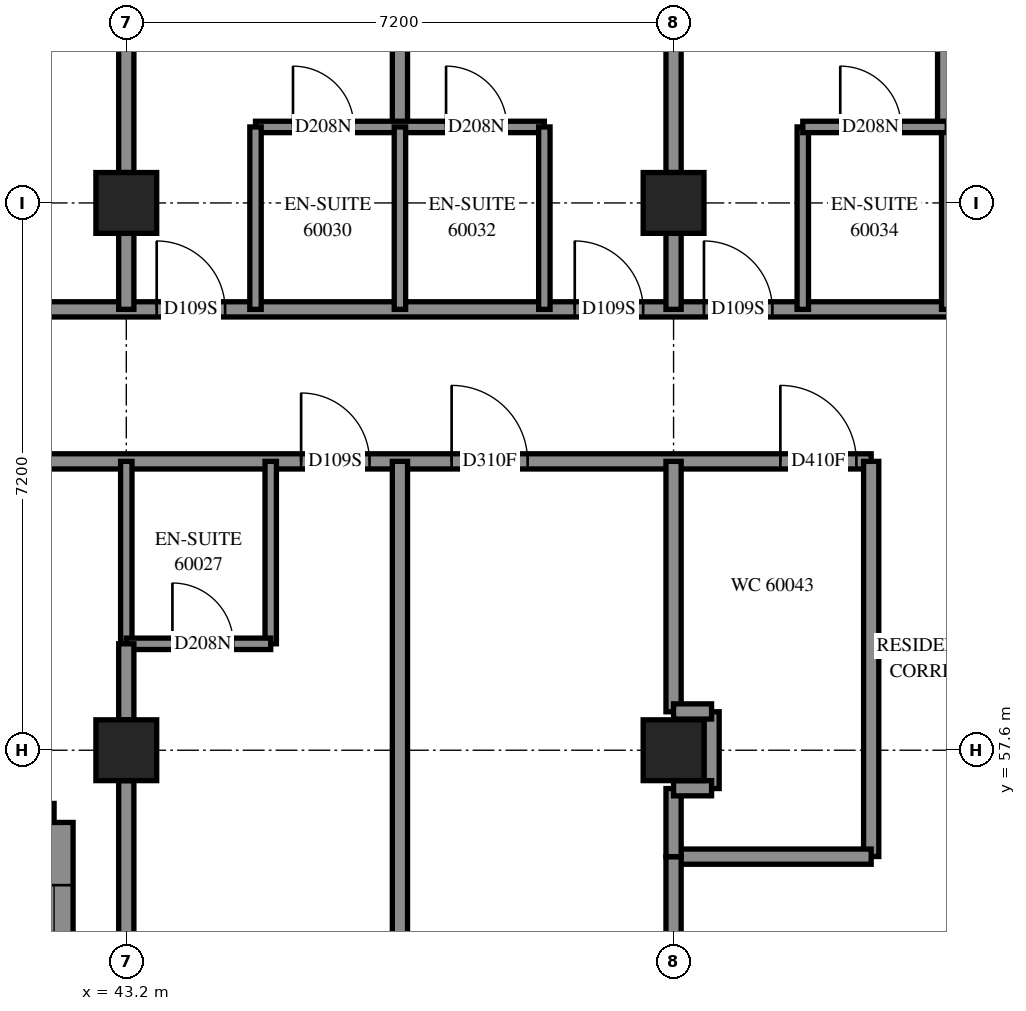
"""IFC4 building model, lengths in metres.
Left out: names, types, materials, properties, quantities, classifications, styles, units other than length and angle.
Written with IfcOpenShell. Run it as: python <this file> out.ifc"""

import sys

from ifc_helpers import new_model, si_unit, direction, frame, frame_2d, origin, origin_2d, place, context, subcontext, project, spatial, polyline, rectangle, outline, extrude, element, fill, save


model = new_model("IFC4")
c1 = context("Model", 3, precision=1e-05, world=origin(), true_north=direction((0.0, 1.0)))
c2 = subcontext(c1, "Body", "Model", "MODEL_VIEW")
j1 = project(units=[si_unit("LENGTHUNIT", "METRE"), si_unit("PLANEANGLEUNIT", "RADIAN")], contexts=[c1])
p1 = place(None, origin())
s1 = spatial("IfcSite", under=j1, at=p1, CompositionType="ELEMENT")
p2 = place(p1, origin())
s2 = spatial("IfcBuilding", under=s1, at=p2, CompositionType="ELEMENT")
p3 = place(p2, frame((0.0, 0.0, 220.2)))
s3 = spatial("IfcBuildingStorey", under=s2, at=p3, CompositionType="ELEMENT", Elevation=220.2)
for number, where, z_axis, x_axis in (
    (1, (43.2, 57.6, 0.0), (0.0, 0.0, 1.0), (1.0, 0.0, 0.0)),
    (2, (43.2, 64.8, 0.0), (0.0, 0.0, 1.0), (1.0, 0.0, 0.0)),
    (3, (50.4, 57.6, 0.0), (0.0, 0.0, 1.0), (1.0, 0.0, 0.0)),
    (4, (50.4, 64.8, 0.0), (0.0, 0.0, 1.0), (1.0, 0.0, 0.0)),
):
    element("IfcColumn", number, at=place(p3, frame(where, z_axis=z_axis, x_axis=x_axis)), inside=s3, PredefinedType="COLUMN", context=c2, shape_type="SweptSolid", body=[
        extrude(rectangle(XDim=0.8, YDim=0.8, at=origin_2d()), origin(), (0.0, 0.0, 1.0), 3.1),
    ])
p4 = place(p3, frame((35.05, 56.65, 0.0), z_axis=(0.0, 0.0, 1.0), x_axis=(1.0, 0.0, 0.0)))
e5 = element("IfcWall", 5, at=p4, inside=s3, PredefinedType="SOLIDWALL", context=c2, shape_type="SweptSolid", body=[
    extrude(outline(polyline([(-0.25, -0.25), (6.95, -0.25), (7.45, 0.25), (0.25, 0.25), (-0.25, -0.25)])), origin(), (0.0, 0.0, 1.0), 3.1),
])
p5 = place(p4, frame((1.35, 0.0, 0.45)))
e6 = element("IfcOpeningElement", 6, at=p5, cuts=e5, PredefinedType="OPENING", context=c2, shape_type="SweptSolid", body=[
    extrude(rectangle(XDim=1.3, YDim=2.5, at=frame_2d((0.65, 1.25))), frame((0.0, 0.26, 0.0), z_axis=(0.0, -1.0, 0.0), x_axis=(1.0, 0.0, 0.0)), (0.0, 0.0, 1.0), 0.52),
])
p6 = place(p4, frame((2.85, 0.0, 0.45)))
e7 = element("IfcOpeningElement", 7, at=p6, cuts=e5, PredefinedType="OPENING", context=c2, shape_type="SweptSolid", body=[
    extrude(rectangle(XDim=1.3, YDim=2.5, at=frame_2d((0.65, 1.25))), frame((0.0, 0.26, 0.0), z_axis=(0.0, -1.0, 0.0), x_axis=(1.0, 0.0, 0.0)), (0.0, 0.0, 1.0), 0.52),
])
p7 = place(p4, frame((5.175, 0.0, 0.45)))
e8 = element("IfcOpeningElement", 8, at=p7, cuts=e5, PredefinedType="OPENING", context=c2, shape_type="SweptSolid", body=[
    extrude(rectangle(XDim=1.2, YDim=2.5, at=frame_2d((0.6, 1.25))), frame((0.0, 0.26, 0.0), z_axis=(0.0, -1.0, 0.0), x_axis=(1.0, 0.0, 0.0)), (0.0, 0.0, 1.0), 0.52),
])
p8 = place(p3, frame((42.25, 56.65, 0.0), z_axis=(0.0, 0.0, 1.0), x_axis=(0.0, -1.0, 0.0)))
e9 = element("IfcWall", 9, at=p8, inside=s3, PredefinedType="SOLIDWALL", context=c2, shape_type="SweptSolid", body=[
    extrude(outline(polyline([(0.25, -0.25), (7.45, -0.25), (6.95, 0.25), (-0.25, 0.25), (0.25, -0.25)])), origin(), (0.0, 0.0, 1.0), 3.1),
])
p9 = place(p8, frame((3.05, 0.0, 0.45)))
e10 = element("IfcOpeningElement", 10, at=p9, cuts=e9, PredefinedType="OPENING", context=c2, shape_type="SweptSolid", body=[
    extrude(rectangle(XDim=1.3, YDim=2.5, at=frame_2d((0.65, 1.25))), frame((0.0, 0.26, 0.0), z_axis=(0.0, -1.0, 0.0), x_axis=(1.0, 0.0, 0.0)), (0.0, 0.0, 1.0), 0.52),
])
p10 = place(p8, frame((4.55, 0.0, 0.45)))
e11 = element("IfcOpeningElement", 11, at=p10, cuts=e9, PredefinedType="OPENING", context=c2, shape_type="SweptSolid", body=[
    extrude(rectangle(XDim=1.3, YDim=2.5, at=frame_2d((0.65, 1.25))), frame((0.0, 0.26, 0.0), z_axis=(0.0, -1.0, 0.0), x_axis=(1.0, 0.0, 0.0)), (0.0, 0.0, 1.0), 0.52),
])
p11 = place(p8, frame((0.825, 0.0, 0.45)))
e12 = element("IfcOpeningElement", 12, at=p11, cuts=e9, PredefinedType="OPENING", context=c2, shape_type="SweptSolid", body=[
    extrude(rectangle(XDim=1.2, YDim=2.5, at=frame_2d((0.6, 1.25))), frame((0.0, 0.26, 0.0), z_axis=(0.0, -1.0, 0.0), x_axis=(1.0, 0.0, 0.0)), (0.0, 0.0, 1.0), 0.52),
])
p12 = place(p3, frame((36.0, 61.4, 0.0), z_axis=(0.0, 0.0, 1.0), x_axis=(1.0, 0.0, 0.0)))
e13 = element("IfcWall", 13, at=p12, inside=s3, PredefinedType="PARTITIONING", context=c2, shape_type="SweptSolid", body=[
    extrude(rectangle(XDim=17.0, YDim=0.2, at=frame_2d((8.5, 0.0))), origin(), (0.0, 0.0, 1.0), 3.1),
])
p13 = place(p12, frame((2.3, 0.0, 0.0)))
e14 = element("IfcOpeningElement", 14, at=p13, cuts=e13, PredefinedType="OPENING", context=c2, shape_type="SweptSolid", body=[
    extrude(rectangle(XDim=0.9, YDim=2.1, at=frame_2d((0.45, 1.05))), frame((0.0, 0.11, 0.0), z_axis=(0.0, -1.0, 0.0), x_axis=(1.0, 0.0, 0.0)), (0.0, 0.0, 1.0), 0.22),
])
p14 = place(p12, frame((4.125, 0.0, 0.0)))
e15 = element("IfcOpeningElement", 15, at=p14, cuts=e13, PredefinedType="OPENING", context=c2, shape_type="SweptSolid", body=[
    extrude(rectangle(XDim=1.0, YDim=2.1, at=frame_2d((0.5, 1.05))), frame((0.0, 0.11, 0.0), z_axis=(0.0, -1.0, 0.0), x_axis=(1.0, 0.0, 0.0)), (0.0, 0.0, 1.0), 0.22),
])
p15 = place(p12, frame((9.5, 0.0, 0.0)))
e16 = element("IfcOpeningElement", 16, at=p15, cuts=e13, PredefinedType="OPENING", context=c2, shape_type="SweptSolid", body=[
    extrude(rectangle(XDim=0.9, YDim=2.1, at=frame_2d((0.45, 1.05))), frame((0.0, 0.11, 0.0), z_axis=(0.0, -1.0, 0.0), x_axis=(1.0, 0.0, 0.0)), (0.0, 0.0, 1.0), 0.22),
])
p16 = place(p12, frame((11.48, 0.0, 0.0)))
e17 = element("IfcOpeningElement", 17, at=p16, cuts=e13, PredefinedType="OPENING", context=c2, shape_type="SweptSolid", body=[
    extrude(rectangle(XDim=1.0, YDim=2.1, at=frame_2d((0.5, 1.05))), frame((0.0, 0.11, 0.0), z_axis=(0.0, -1.0, 0.0), x_axis=(1.0, 0.0, 0.0)), (0.0, 0.0, 1.0), 0.22),
])
p17 = place(p12, frame((15.805, 0.0, 0.0)))
e18 = element("IfcOpeningElement", 18, at=p17, cuts=e13, PredefinedType="OPENING", context=c2, shape_type="SweptSolid", body=[
    extrude(rectangle(XDim=1.0, YDim=2.1, at=frame_2d((0.5, 1.05))), frame((0.0, 0.11, 0.0), z_axis=(0.0, -1.0, 0.0), x_axis=(1.0, 0.0, 0.0)), (0.0, 0.0, 1.0), 0.22),
])
p18 = place(p3, frame((40.602, 63.4, 0.0), z_axis=(0.0, 0.0, 1.0), x_axis=(1.0, 0.0, 0.0)))
e19 = element("IfcWall", 19, at=p18, inside=s3, PredefinedType="PARTITIONING", context=c2, shape_type="SweptSolid", body=[
    extrude(rectangle(XDim=14.398, YDim=0.2, at=frame_2d((7.199, 0.0))), origin(), (0.0, 0.0, 1.0), 3.1),
])
p19 = place(p18, frame((2.998, 0.0, 0.0)))
e20 = element("IfcOpeningElement", 20, at=p19, cuts=e19, PredefinedType="OPENING", context=c2, shape_type="SweptSolid", body=[
    extrude(rectangle(XDim=0.9, YDim=2.1, at=frame_2d((0.45, 1.05))), frame((0.0, 0.11, 0.0), z_axis=(0.0, -1.0, 0.0), x_axis=(1.0, 0.0, 0.0)), (0.0, 0.0, 1.0), 0.22),
])
p20 = place(p18, frame((8.498, 0.0, 0.0)))
e21 = element("IfcOpeningElement", 21, at=p20, cuts=e19, PredefinedType="OPENING", context=c2, shape_type="SweptSolid", body=[
    extrude(rectangle(XDim=0.9, YDim=2.1, at=frame_2d((0.45, 1.05))), frame((0.0, 0.11, 0.0), z_axis=(0.0, -1.0, 0.0), x_axis=(1.0, 0.0, 0.0)), (0.0, 0.0, 1.0), 0.22),
])
p21 = place(p18, frame((10.198, 0.0, 0.0)))
e22 = element("IfcOpeningElement", 22, at=p21, cuts=e19, PredefinedType="OPENING", context=c2, shape_type="SweptSolid", body=[
    extrude(rectangle(XDim=0.9, YDim=2.1, at=frame_2d((0.45, 1.05))), frame((0.0, 0.11, 0.0), z_axis=(0.0, -1.0, 0.0), x_axis=(1.0, 0.0, 0.0)), (0.0, 0.0, 1.0), 0.22),
])
p22 = place(p3, frame((46.8, 49.7, 0.0), z_axis=(0.0, 0.0, 1.0), x_axis=(0.0, 1.0, 0.0)))
e23 = element("IfcWall", 23, at=p22, inside=s3, PredefinedType="PARTITIONING", context=c2, shape_type="SweptSolid", body=[
    extrude(rectangle(XDim=11.7, YDim=0.2, at=frame_2d((5.85, 0.0))), origin(), (0.0, 0.0, 1.0), 3.1),
])
p23 = place(p3, frame((46.8, 65.8, 0.0), z_axis=(0.0, 0.0, 1.0), x_axis=(0.0, 1.0, 0.0)))
e24 = element("IfcWall", 24, at=p23, inside=s3, PredefinedType="PARTITIONING", context=c2, shape_type="SweptSolid", body=[
    extrude(rectangle(XDim=7.069, YDim=0.2, at=frame_2d((3.535, 0.0))), origin(), (0.0, 0.0, 1.0), 3.1),
])
p24 = place(p3, frame((53.973, 65.8, 0.0), z_axis=(0.0, 0.0, 1.0), x_axis=(0.0, 1.0, 0.0)))
e25 = element("IfcWall", 25, at=p24, inside=s3, PredefinedType="PARTITIONING", context=c2, shape_type="SweptSolid", body=[
    extrude(rectangle(XDim=6.994, YDim=0.2, at=frame_2d((3.497, 0.0))), origin(), (0.0, 0.0, 1.0), 3.1),
])
p25 = place(p3, frame((43.2, 50.8, 0.0), z_axis=(0.0, 0.0, 1.0), x_axis=(0.0, 1.0, 0.0)))
e26 = element("IfcWall", 26, at=p25, inside=s3, PredefinedType="PARTITIONING", context=c2, shape_type="SweptSolid", body=[
    extrude(rectangle(XDim=6.4, YDim=0.2, at=frame_2d((3.2, 0.0))), origin(), (0.0, 0.0, 1.0), 2.6),
])
for number, where, z_axis, x_axis in (
    (27, (43.2, 65.2, 0.0), (0.0, 0.0, 1.0), (0.0, 1.0, 0.0)),
    (28, (50.4, 65.2, 0.0), (0.0, 0.0, 1.0), (0.0, 1.0, 0.0)),
):
    element("IfcWall", number, at=place(p3, frame(where, z_axis=z_axis, x_axis=x_axis)), inside=s3, PredefinedType="PARTITIONING", context=c2, shape_type="SweptSolid", body=[
        extrude(rectangle(XDim=6.4, YDim=0.2, at=frame_2d((3.2, 0.0))), origin(), (0.0, 0.0, 1.0), 3.1),
    ])
p26 = place(p3, frame((53.0, 56.202, 0.0), z_axis=(0.0, 0.0, 1.0), x_axis=(0.0, 1.0, 0.0)))
e29 = element("IfcWall", 29, at=p26, inside=s3, PredefinedType="PARTITIONING", context=c2, shape_type="SweptSolid", body=[
    extrude(rectangle(XDim=5.198, YDim=0.2, at=frame_2d((2.599, 0.0))), origin(), (0.0, 0.0, 1.0), 3.1),
])
p27 = place(p3, frame((44.9, 65.8, 0.0), z_axis=(0.0, 0.0, 1.0), x_axis=(1.0, 0.0, 0.0)))
e30 = element("IfcWall", 30, at=p27, inside=s3, PredefinedType="PARTITIONING", context=c2, shape_type="SweptSolid", body=[
    extrude(rectangle(XDim=3.8, YDim=0.15, at=frame_2d((1.9, 0.0))), origin(), (0.0, 0.0, 1.0), 3.1),
])
p28 = place(p27, frame((0.493, 0.0, 0.0)))
e31 = element("IfcOpeningElement", 31, at=p28, cuts=e30, PredefinedType="OPENING", context=c2, shape_type="SweptSolid", body=[
    extrude(rectangle(XDim=0.8, YDim=2.1, at=frame_2d((0.4, 1.05))), frame((0.0, 0.085, 0.0), z_axis=(0.0, -1.0, 0.0), x_axis=(1.0, 0.0, 0.0)), (0.0, 0.0, 1.0), 0.17),
])
p29 = place(p27, frame((2.507, 0.0, 0.0)))
e32 = element("IfcOpeningElement", 32, at=p29, cuts=e30, PredefinedType="OPENING", context=c2, shape_type="SweptSolid", body=[
    extrude(rectangle(XDim=0.8, YDim=2.1, at=frame_2d((0.4, 1.05))), frame((0.0, 0.085, 0.0), z_axis=(0.0, -1.0, 0.0), x_axis=(1.0, 0.0, 0.0)), (0.0, 0.0, 1.0), 0.17),
])
p30 = place(p3, frame((50.4, 58.106, 0.0), z_axis=(0.0, 0.0, 1.0), x_axis=(0.0, 1.0, 0.0)))
e33 = element("IfcWall", 33, at=p30, inside=s3, PredefinedType="PARTITIONING", context=c2, shape_type="SweptSolid", body=[
    extrude(rectangle(XDim=3.294, YDim=0.2, at=frame_2d((1.647, 0.0))), origin(), (0.0, 0.0, 1.0), 3.1),
])
p31 = place(p3, frame((50.4, 56.2, 0.0), z_axis=(0.0, 0.0, 1.0), x_axis=(1.0, 0.0, 0.0)))
e34 = element("IfcWall", 34, at=p31, inside=s3, PredefinedType="PARTITIONING", context=c2, shape_type="SweptSolid", body=[
    extrude(rectangle(XDim=2.6, YDim=0.2, at=frame_2d((1.3, 0.0))), origin(), (0.0, 0.0, 1.0), 3.1),
])
for number, where, z_axis, x_axis in (
    (35, (45.1, 59.0, 0.0), (0.0, 0.0, 1.0), (0.0, 1.0, 0.0)),
    (36, (43.2, 59.0, 0.0), (0.0, 0.0, 1.0), (0.0, 1.0, 0.0)),
    (37, (44.9, 63.4, 0.0), (0.0, 0.0, 1.0), (0.0, 1.0, 0.0)),
    (38, (46.8, 63.4, 0.0), (0.0, 0.0, 1.0), (0.0, 1.0, 0.0)),
    (39, (48.7, 63.4, 0.0), (0.0, 0.0, 1.0), (0.0, 1.0, 0.0)),
    (40, (52.1, 63.4, 0.0), (0.0, 0.0, 1.0), (0.0, 1.0, 0.0)),
    (41, (54.0, 63.4, 0.0), (0.0, 0.0, 1.0), (0.0, 1.0, 0.0)),
):
    element("IfcWall", number, at=place(p3, frame(where, z_axis=z_axis, x_axis=x_axis)), inside=s3, PredefinedType="PARTITIONING", context=c2, shape_type="SweptSolid", body=[
        extrude(rectangle(XDim=2.4, YDim=0.15, at=frame_2d((1.2, 0.0))), origin(), (0.0, 0.0, 1.0), 3.1),
    ])
p32 = place(p3, frame((50.4, 54.2, 0.0), z_axis=(0.0, 0.0, 1.0), x_axis=(0.0, 1.0, 0.0)))
e42 = element("IfcWall", 42, at=p32, inside=s3, PredefinedType="PARTITIONING", context=c2, shape_type="SweptSolid", body=[
    extrude(rectangle(XDim=2.0, YDim=0.2, at=frame_2d((1.0, 0.0))), origin(), (0.0, 0.0, 1.0), 3.1),
])
p33 = place(p3, frame((43.2, 59.0, 0.0), z_axis=(0.0, 0.0, 1.0), x_axis=(1.0, 0.0, 0.0)))
e43 = element("IfcWall", 43, at=p33, inside=s3, PredefinedType="PARTITIONING", context=c2, shape_type="SweptSolid", body=[
    extrude(rectangle(XDim=1.9, YDim=0.15, at=frame_2d((0.95, 0.0))), origin(), (0.0, 0.0, 1.0), 3.1),
])
p34 = place(p33, frame((0.607, 0.0, 0.0)))
e44 = element("IfcOpeningElement", 44, at=p34, cuts=e43, PredefinedType="OPENING", context=c2, shape_type="SweptSolid", body=[
    extrude(rectangle(XDim=0.8, YDim=2.1, at=frame_2d((0.4, 1.05))), frame((0.0, 0.085, 0.0), z_axis=(0.0, -1.0, 0.0), x_axis=(1.0, 0.0, 0.0)), (0.0, 0.0, 1.0), 0.17),
])
p35 = place(p3, frame((52.1, 65.8, 0.0), z_axis=(0.0, 0.0, 1.0), x_axis=(1.0, 0.0, 0.0)))
e45 = element("IfcWall", 45, at=p35, inside=s3, PredefinedType="PARTITIONING", context=c2, shape_type="SweptSolid", body=[
    extrude(rectangle(XDim=1.9, YDim=0.15, at=frame_2d((0.95, 0.0))), origin(), (0.0, 0.0, 1.0), 3.1),
])
p36 = place(p35, frame((0.493, 0.0, 0.0)))
e46 = element("IfcOpeningElement", 46, at=p36, cuts=e45, PredefinedType="OPENING", context=c2, shape_type="SweptSolid", body=[
    extrude(rectangle(XDim=0.8, YDim=2.1, at=frame_2d((0.4, 1.05))), frame((0.0, 0.085, 0.0), z_axis=(0.0, -1.0, 0.0), x_axis=(1.0, 0.0, 0.0)), (0.0, 0.0, 1.0), 0.17),
])
p37 = place(p3, frame((50.9, 57.096, 0.0), z_axis=(0.0, 0.0, 1.0), x_axis=(0.0, 1.0, 0.0)))
e47 = element("IfcWall", 47, at=p37, inside=s3, PredefinedType="PARTITIONING", context=c2, shape_type="SweptSolid", body=[
    extrude(rectangle(XDim=1.01, YDim=0.2, at=frame_2d((0.505, 0.0))), origin(), (0.0, 0.0, 1.0), 3.1),
])
for number, where, z_axis, x_axis in (
    (48, (43.2, 63.4, 0.0), (0.0, 0.0, 1.0), (0.0, 1.0, 0.0)),
    (49, (50.4, 63.4, 0.0), (0.0, 0.0, 1.0), (0.0, 1.0, 0.0)),
    (50, (43.2, 58.0, 0.0), (0.0, 0.0, 1.0), (0.0, 1.0, 0.0)),
):
    element("IfcWall", number, at=place(p3, frame(where, z_axis=z_axis, x_axis=x_axis)), inside=s3, PredefinedType="PARTITIONING", context=c2, shape_type="SweptSolid", body=[
        extrude(rectangle(XDim=1.0, YDim=0.2, at=frame_2d((0.5, 0.0))), origin(), (0.0, 0.0, 1.0), 3.1),
    ])
p38 = place(p3, frame((50.4, 56.2, 0.0), z_axis=(0.0, 0.0, 1.0), x_axis=(0.0, 1.0, 0.0)))
e51 = element("IfcWall", 51, at=p38, inside=s3, PredefinedType="PARTITIONING", context=c2, shape_type="SweptSolid", body=[
    extrude(rectangle(XDim=0.896, YDim=0.2, at=frame_2d((0.448, 0.0))), origin(), (0.0, 0.0, 1.0), 3.1),
])
for number, where, z_axis, x_axis in (
    (52, (50.4, 58.11, 0.0), (0.0, 0.0, 1.0), (1.0, 0.0, 0.0)),
    (53, (50.4, 57.1, 0.0), (0.0, 0.0, 1.0), (1.0, 0.0, 0.0)),
):
    element("IfcWall", number, at=place(p3, frame(where, z_axis=z_axis, x_axis=x_axis)), inside=s3, PredefinedType="PARTITIONING", context=c2, shape_type="SweptSolid", body=[
        extrude(rectangle(XDim=0.5, YDim=0.2, at=frame_2d((0.25, 0.0))), origin(), (0.0, 0.0, 1.0), 3.1),
    ])
p39 = place(p11, origin())
e54 = element("IfcWindow", 54, at=p39, inside=s3, PartitioningType="SINGLE_PANEL", PredefinedType="WINDOW", context=c2, shape_type="SweptSolid", body=[
    extrude(rectangle(XDim=1.2, YDim=2.5, at=frame_2d((0.6, 1.25))), frame((0.0, 0.18, 0.0), z_axis=(0.0, -1.0, 0.0), x_axis=(1.0, 0.0, 0.0)), (0.0, 0.0, 1.0), 0.06),
])
fill(e12, e54)
p40 = place(p15, origin())
e55 = element("IfcDoor", 55, at=p40, inside=s3, OperationType="SINGLE_SWING_LEFT", PredefinedType="DOOR", context=c2, shape_type="SweptSolid", body=[
    extrude(rectangle(XDim=0.9, YDim=2.1, at=frame_2d((0.45, 1.05))), frame((0.0, 0.025, 0.0), z_axis=(0.0, -1.0, 0.0), x_axis=(1.0, 0.0, 0.0)), (0.0, 0.0, 1.0), 0.05),
])
fill(e16, e55)
p41 = place(p34, origin())
e56 = element("IfcDoor", 56, at=p41, inside=s3, OperationType="SINGLE_SWING_RIGHT", PredefinedType="DOOR", context=c2, shape_type="SweptSolid", body=[
    extrude(rectangle(XDim=0.8, YDim=2.1, at=frame_2d((0.4, 1.05))), frame((0.0, 0.025, 0.0), z_axis=(0.0, -1.0, 0.0), x_axis=(1.0, 0.0, 0.0)), (0.0, 0.0, 1.0), 0.05),
])
fill(e44, e56)
p42 = place(p19, origin())
e57 = element("IfcDoor", 57, at=p42, inside=s3, OperationType="SINGLE_SWING_RIGHT", PredefinedType="DOOR", context=c2, shape_type="SweptSolid", body=[
    extrude(rectangle(XDim=0.9, YDim=2.1, at=frame_2d((0.45, 1.05))), frame((0.0, 0.025, 0.0), z_axis=(0.0, -1.0, 0.0), x_axis=(1.0, 0.0, 0.0)), (0.0, 0.0, 1.0), 0.05),
])
fill(e20, e57)
p43 = place(p28, origin())
e58 = element("IfcDoor", 58, at=p43, inside=s3, OperationType="SINGLE_SWING_RIGHT", PredefinedType="DOOR", context=c2, shape_type="SweptSolid", body=[
    extrude(rectangle(XDim=0.8, YDim=2.1, at=frame_2d((0.4, 1.05))), frame((0.0, 0.025, 0.0), z_axis=(0.0, -1.0, 0.0), x_axis=(1.0, 0.0, 0.0)), (0.0, 0.0, 1.0), 0.05),
])
fill(e31, e58)
p44 = place(p20, origin())
e59 = element("IfcDoor", 59, at=p44, inside=s3, OperationType="SINGLE_SWING_LEFT", PredefinedType="DOOR", context=c2, shape_type="SweptSolid", body=[
    extrude(rectangle(XDim=0.9, YDim=2.1, at=frame_2d((0.45, 1.05))), frame((0.0, 0.025, 0.0), z_axis=(0.0, -1.0, 0.0), x_axis=(1.0, 0.0, 0.0)), (0.0, 0.0, 1.0), 0.05),
])
fill(e21, e59)
p45 = place(p29, origin())
e60 = element("IfcDoor", 60, at=p45, inside=s3, OperationType="SINGLE_SWING_RIGHT", PredefinedType="DOOR", context=c2, shape_type="SweptSolid", body=[
    extrude(rectangle(XDim=0.8, YDim=2.1, at=frame_2d((0.4, 1.05))), frame((0.0, 0.025, 0.0), z_axis=(0.0, -1.0, 0.0), x_axis=(1.0, 0.0, 0.0)), (0.0, 0.0, 1.0), 0.05),
])
fill(e32, e60)
p46 = place(p21, origin())
e61 = element("IfcDoor", 61, at=p46, inside=s3, OperationType="SINGLE_SWING_RIGHT", PredefinedType="DOOR", context=c2, shape_type="SweptSolid", body=[
    extrude(rectangle(XDim=0.9, YDim=2.1, at=frame_2d((0.45, 1.05))), frame((0.0, 0.025, 0.0), z_axis=(0.0, -1.0, 0.0), x_axis=(1.0, 0.0, 0.0)), (0.0, 0.0, 1.0), 0.05),
])
fill(e22, e61)
p47 = place(p36, origin())
e62 = element("IfcDoor", 62, at=p47, inside=s3, OperationType="SINGLE_SWING_RIGHT", PredefinedType="DOOR", context=c2, shape_type="SweptSolid", body=[
    extrude(rectangle(XDim=0.8, YDim=2.1, at=frame_2d((0.4, 1.05))), frame((0.0, 0.025, 0.0), z_axis=(0.0, -1.0, 0.0), x_axis=(1.0, 0.0, 0.0)), (0.0, 0.0, 1.0), 0.05),
])
fill(e46, e62)
p48 = place(p16, origin())
e63 = element("IfcDoor", 63, at=p48, inside=s3, OperationType="SINGLE_SWING_RIGHT", PredefinedType="DOOR", context=c2, shape_type="SweptSolid", body=[
    extrude(rectangle(XDim=1.0, YDim=2.1, at=frame_2d((0.5, 1.05))), frame((0.0, 0.025, 0.0), z_axis=(0.0, -1.0, 0.0), x_axis=(1.0, 0.0, 0.0)), (0.0, 0.0, 1.0), 0.05),
])
fill(e17, e63)
p49 = place(p17, origin())
e64 = element("IfcDoor", 64, at=p49, inside=s3, OperationType="SINGLE_SWING_LEFT", PredefinedType="DOOR", context=c2, shape_type="SweptSolid", body=[
    extrude(rectangle(XDim=1.0, YDim=2.1, at=frame_2d((0.5, 1.05))), frame((0.0, 0.025, 0.0), z_axis=(0.0, -1.0, 0.0), x_axis=(1.0, 0.0, 0.0)), (0.0, 0.0, 1.0), 0.05),
])
fill(e18, e64)
save(model, sys.argv[1])
